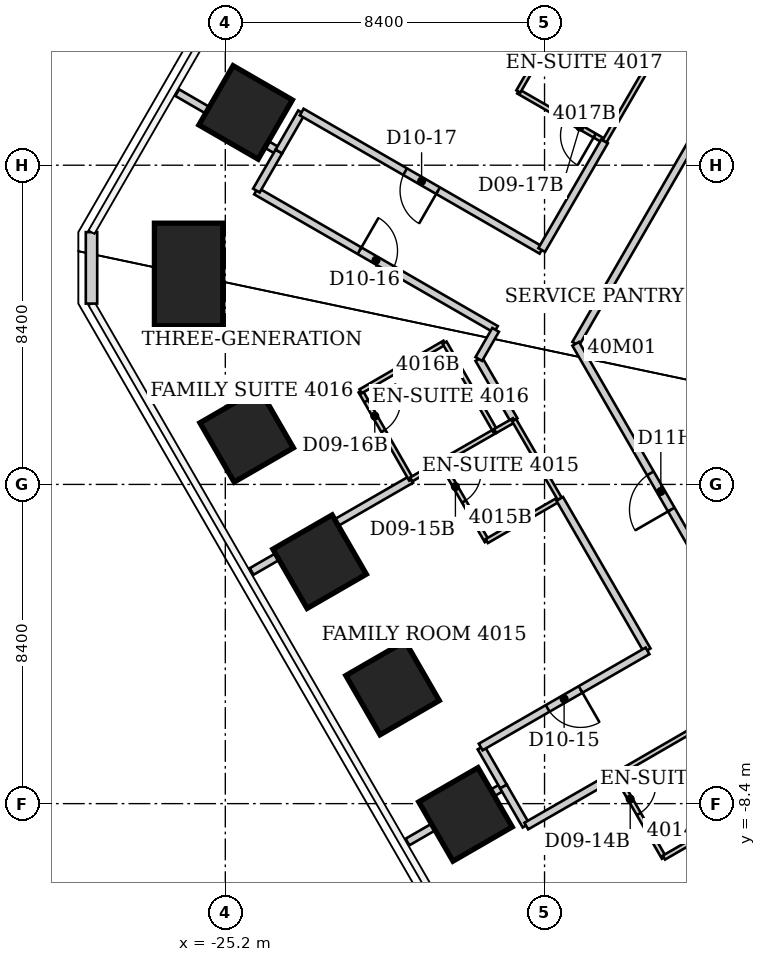
"""IFC4 building model, lengths in metres.
Left out: names, types, materials, properties, quantities, classifications, styles, units other than length and angle.
Written with IfcOpenShell. Run it as: python <this file> out.ifc"""

import sys

from ifc_helpers import new_model, si_unit, direction, frame, frame_2d, origin, origin_2d, place, context, subcontext, project, spatial, rectangle, extrude, element, fill, save


model = new_model("IFC4")
c1 = context("Model", 3, precision=1e-05, world=origin(), true_north=direction((0.0, 1.0)))
c2 = subcontext(c1, "Body", "Model", "MODEL_VIEW")
j1 = project(units=[si_unit("LENGTHUNIT", "METRE"), si_unit("PLANEANGLEUNIT", "RADIAN")], contexts=[c1])
p1 = place(None, origin())
s1 = spatial("IfcSite", under=j1, at=p1, CompositionType="ELEMENT")
p2 = place(p1, origin())
s2 = spatial("IfcBuilding", under=s1, at=p2, CompositionType="ELEMENT")
p3 = place(p2, frame((0.0, 0.0, 161.4)))
s3 = spatial("IfcBuildingStorey", under=s2, at=p3, CompositionType="ELEMENT", Elevation=161.4)
p4 = place(p3, frame((-18.88, -8.684, 0.0), z_axis=(0.043125124656, 0.019829856427, 0.998872864992), x_axis=(-0.865002196318, -0.499537256443, 0.047262350669)))
e1 = element("IfcColumn", 1, at=p4, inside=s3, PredefinedType="COLUMN", context=c2, shape_type="SweptSolid", body=[
    extrude(rectangle(XDim=1.8, YDim=1.8, at=origin_2d()), origin(), (0.0, 0.0, 1.0), 3.804),
])
p5 = place(p3, frame((-20.8, -5.358, 0.0), z_axis=(0.047485394503, 0.012192195886, 0.998797520856), x_axis=(-0.865155048747, -0.499275895122, 0.047226286935)))
e2 = element("IfcColumn", 2, at=p5, inside=s3, PredefinedType="COLUMN", context=c2, shape_type="SweptSolid", body=[
    extrude(rectangle(XDim=1.8, YDim=1.8, at=origin_2d()), origin(), (0.0, 0.0, 1.0), 3.805),
])
p6 = place(p3, frame((-22.719, -2.033, 0.0), z_axis=(0.05184096697, 0.004683651719, 0.998644369909), x_axis=(-0.8641219969, -0.501063474394, 0.047207722912)))
e3 = element("IfcColumn", 3, at=p6, inside=s3, PredefinedType="COLUMN", context=c2, shape_type="SweptSolid", body=[
    extrude(rectangle(XDim=1.8, YDim=1.8, at=origin_2d()), origin(), (0.0, 0.0, 1.0), 3.805),
])
p7 = place(p3, frame((-24.638, 1.292, 0.0), z_axis=(0.056190949949, -0.002950666322, 0.998415680322), x_axis=(-0.864380324341, -0.500621456598, 0.047167913724)))
e4 = element("IfcColumn", 4, at=p7, inside=s3, PredefinedType="COLUMN", context=c2, shape_type="SweptSolid", body=[
    extrude(rectangle(XDim=1.8, YDim=1.8, at=origin_2d()), origin(), (0.0, 0.0, 1.0), 3.806),
])
p8 = place(p3, frame((-26.166, 5.524, 0.0), z_axis=(0.06021332392, -0.012696739229, 0.998104778285), x_axis=(-0.998185498237, -0.001024676941, 0.060205158806)))
e5 = element("IfcColumn", 5, at=p8, inside=s3, PredefinedType="COLUMN", context=c2, shape_type="SweptSolid", body=[
    extrude(rectangle(XDim=1.8, YDim=2.7, at=origin_2d()), origin(), (0.0, 0.0, 1.0), 3.807),
])
p9 = place(p3, frame((-24.665, 9.788, 0.0), z_axis=(0.055410421986, -0.021997424469, 0.99822131737), x_axis=(-0.864198060677, 0.499682708675, 0.058982222519)))
e6 = element("IfcColumn", 6, at=p9, inside=s3, PredefinedType="COLUMN", context=c2, shape_type="SweptSolid", body=[
    extrude(rectangle(XDim=1.8, YDim=1.8, at=origin_2d()), origin(), (0.0, 0.0, 1.0), 3.807),
])
p10 = place(p3, frame((-28.721, 4.759, 0.0), z_axis=(0.0, 0.0, 1.0), x_axis=(0.0, 1.0, 0.0)))
e7 = element("IfcWall", 7, at=p10, inside=s3, PredefinedType="SOLIDWALL", context=c2, shape_type="SweptSolid", body=[
    extrude(rectangle(XDim=1.88, YDim=0.3, at=frame_2d((0.94, 0.0))), origin(), (0.0, 0.0, 1.0), 3.64),
])
p11 = place(p3, frame((-26.466, 10.31, 0.0), z_axis=(0.0, 0.0, 1.0), x_axis=(0.865362911021, -0.501145719556, 0.0)))
e8 = element("IfcWall", 8, at=p11, inside=s3, PredefinedType="PARTITIONING", context=c2, shape_type="SweptSolid", body=[
    extrude(rectangle(XDim=3.077, YDim=0.2, at=frame_2d((1.539, 0.0))), origin(), (0.0, 0.0, 1.0), 3.64),
])
p12 = place(p3, frame((-24.506, -2.29, 0.0), z_axis=(0.0, 0.0, 1.0), x_axis=(0.86626361228, 0.499587183622, 0.0)))
e9 = element("IfcWall", 9, at=p12, inside=s3, PredefinedType="PARTITIONING", context=c2, shape_type="SweptSolid", body=[
    extrude(rectangle(XDim=4.844, YDim=0.2, at=frame_2d((2.422, 0.0))), origin(), (0.0, 0.0, 1.0), 3.64),
])
p13 = place(p3, frame((-24.39, 7.72, 0.0), z_axis=(0.0, 0.0, 1.0), x_axis=(0.86620846199, -0.499682799761, 0.0)))
e10 = element("IfcWall", 10, at=p13, inside=s3, PredefinedType="PARTITIONING", context=c2, shape_type="SweptSolid", body=[
    extrude(rectangle(XDim=7.284, YDim=0.2, at=frame_2d((3.642, 0.0))), origin(), (0.0, 0.0, 1.0), 3.64),
])
p14 = place(p13, frame((3.142, 0.0, 0.0)))
e11 = element("IfcOpeningElement", 11, at=p14, cuts=e10, PredefinedType="OPENING", context=c2, shape_type="SweptSolid", body=[
    extrude(rectangle(XDim=1.0, YDim=2.13, at=frame_2d((0.5, 1.065))), frame((0.0, 0.1, 0.0), z_axis=(0.0, -1.0, 0.0), x_axis=(1.0, 0.0, 0.0)), (0.0, 0.0, 1.0), 0.2),
])
p15 = place(p3, frame((-23.79, 8.76, 0.0), z_axis=(0.0, 0.0, 1.0), x_axis=(-0.499704629046, -0.866195869137, 0.0)))
e12 = element("IfcWall", 12, at=p15, inside=s3, PredefinedType="PARTITIONING", context=c2, shape_type="SweptSolid", body=[
    extrude(rectangle(XDim=1.186, YDim=0.2, at=frame_2d((0.593, 0.0))), origin(), (0.0, 0.0, 1.0), 3.64),
])
p16 = place(p3, frame((-23.195, 9.791, 0.0), z_axis=(0.0, 0.0, 1.0), x_axis=(-0.499734288277, -0.866178758179, 0.0)))
e13 = element("IfcWall", 13, at=p16, inside=s3, PredefinedType="PARTITIONING", context=c2, shape_type="SweptSolid", body=[
    extrude(rectangle(XDim=1.191, YDim=0.2, at=frame_2d((0.595, 0.0))), origin(), (0.0, 0.0, 1.0), 3.64),
])
p17 = place(p3, frame((-21.64, 2.45, 0.0), z_axis=(0.0, 0.0, 1.0), x_axis=(0.497288831399, -0.867585049529, 0.0)))
e14 = element("IfcWall", 14, at=p17, inside=s3, PredefinedType="PARTITIONING", context=c2, shape_type="SweptSolid", body=[
    extrude(rectangle(XDim=2.674, YDim=0.12, at=frame_2d((1.337, 0.0))), origin(), (0.0, 0.0, 1.0), 3.64),
])
p18 = place(p17, frame((0.3, 0.0, 0.0)))
e15 = element("IfcOpeningElement", 15, at=p18, cuts=e14, PredefinedType="OPENING", context=c2, shape_type="SweptSolid", body=[
    extrude(rectangle(XDim=0.9, YDim=2.03, at=frame_2d((0.45, 1.015))), frame((0.0, 0.06, 0.0), z_axis=(0.0, -1.0, 0.0), x_axis=(1.0, 0.0, 0.0)), (0.0, 0.0, 1.0), 0.12),
])
p19 = place(p3, frame((-20.406, -9.41, 0.0), z_axis=(0.0, 0.0, 1.0), x_axis=(0.865794621161, 0.500399514358, 0.0)))
e16 = element("IfcWall", 16, at=p19, inside=s3, PredefinedType="PARTITIONING", context=c2, shape_type="SweptSolid", body=[
    extrude(rectangle(XDim=2.903, YDim=0.2, at=frame_2d((1.451, 0.0))), origin(), (0.0, 0.0, 1.0), 3.64),
])
p20 = place(p3, frame((-20.31, 0.13, 0.0), z_axis=(0.0, 0.0, 1.0), x_axis=(0.864088651014, 0.503339649926, 0.0)))
e17 = element("IfcWall", 17, at=p20, inside=s3, PredefinedType="PARTITIONING", context=c2, shape_type="SweptSolid", body=[
    extrude(rectangle(XDim=0.914, YDim=0.12, at=frame_2d((0.457, 0.0))), origin(), (0.0, 0.0, 1.0), 3.64),
])
p21 = place(p3, frame((-19.52, 0.59, 0.0), z_axis=(0.0, 0.0, 1.0), x_axis=(0.499693115345, -0.866202511239, 0.0)))
e18 = element("IfcWall", 18, at=p21, inside=s3, PredefinedType="PARTITIONING", context=c2, shape_type="SweptSolid", body=[
    extrude(rectangle(XDim=2.401, YDim=0.12, at=frame_2d((1.201, 0.0))), origin(), (0.0, 0.0, 1.0), 3.64),
])
p22 = place(p21, frame((0.3, 0.0, 0.0)))
e19 = element("IfcOpeningElement", 19, at=p22, cuts=e18, PredefinedType="OPENING", context=c2, shape_type="SweptSolid", body=[
    extrude(rectangle(XDim=0.9, YDim=2.03, at=frame_2d((0.45, 1.015))), frame((0.0, 0.06, 0.0), z_axis=(0.0, -1.0, 0.0), x_axis=(1.0, 0.0, 0.0)), (0.0, 0.0, 1.0), 0.12),
])
p23 = place(p3, frame((-19.52, 0.59, 0.0), z_axis=(0.0, 0.0, 1.0), x_axis=(0.86741733639, 0.49758131449, 0.0)))
e20 = element("IfcWall", 20, at=p23, inside=s3, PredefinedType="PARTITIONING", context=c2, shape_type="SweptSolid", body=[
    extrude(rectangle(XDim=1.64, YDim=0.12, at=frame_2d((0.82, 0.0))), origin(), (0.0, 0.0, 1.0), 3.64),
])
p24 = place(p3, frame((-19.43, 3.73, 0.0), z_axis=(0.0, 0.0, 1.0), x_axis=(-0.865328095335, -0.50120583339, 0.0)))
e21 = element("IfcWall", 21, at=p24, inside=s3, PredefinedType="PARTITIONING", context=c2, shape_type="SweptSolid", body=[
    extrude(rectangle(XDim=2.554, YDim=0.12, at=frame_2d((1.277, 0.0))), origin(), (0.0, 0.0, 1.0), 3.64),
])
p25 = place(p3, frame((-18.53, 3.3, 0.0), z_axis=(0.0, 0.0, 1.0), x_axis=(0.50013539823, -0.865947217466, 0.0)))
e22 = element("IfcWall", 22, at=p25, inside=s3, PredefinedType="PARTITIONING", context=c2, shape_type="SweptSolid", body=[
    extrude(rectangle(XDim=1.859, YDim=0.2, at=frame_2d((0.93, 0.0))), origin(), (0.0, 0.0, 1.0), 3.64),
])
p26 = place(p3, frame((-18.472, -6.923, 0.0), z_axis=(0.0, 0.0, 1.0), x_axis=(0.499793761865, -0.866144442689, 0.0)))
e23 = element("IfcWall", 23, at=p26, inside=s3, PredefinedType="PARTITIONING", context=c2, shape_type="SweptSolid", body=[
    extrude(rectangle(XDim=1.186, YDim=0.2, at=frame_2d((0.593, 0.0))), origin(), (0.0, 0.0, 1.0), 3.64),
])
p27 = place(p3, frame((-18.32, -1.49, 0.0), z_axis=(0.0, 0.0, 1.0), x_axis=(0.865732595383, 0.500506816428, 0.0)))
e24 = element("IfcWall", 24, at=p27, inside=s3, PredefinedType="PARTITIONING", context=c2, shape_type="SweptSolid", body=[
    extrude(rectangle(XDim=2.218, YDim=0.12, at=frame_2d((1.109, 0.0))), origin(), (0.0, 0.0, 1.0), 3.64),
])
p28 = place(p3, frame((-18.1, 1.41, 0.0), z_axis=(0.0, 0.0, 1.0), x_axis=(-0.497288831399, 0.867585049529, 0.0)))
e25 = element("IfcWall", 25, at=p28, inside=s3, PredefinedType="PARTITIONING", context=c2, shape_type="SweptSolid", body=[
    extrude(rectangle(XDim=2.674, YDim=0.12, at=frame_2d((1.337, 0.0))), origin(), (0.0, 0.0, 1.0), 3.64),
])
p29 = place(p3, frame((-18.098, 1.406, 0.0), z_axis=(0.0, 0.0, 1.0), x_axis=(0.86863611018, 0.495450611152, 0.0)))
e26 = element("IfcWall", 26, at=p29, inside=s3, PredefinedType="PARTITIONING", context=c2, shape_type="SweptSolid", body=[
    extrude(rectangle(XDim=0.573, YDim=0.12, at=frame_2d((0.287, 0.0))), origin(), (0.0, 0.0, 1.0), 3.64),
])
p30 = place(p3, frame((-18.087, 4.067, 0.0), z_axis=(0.0, 0.0, 1.0), x_axis=(-0.499905448813, -0.866079986056, 0.0)))
e27 = element("IfcWall", 27, at=p30, inside=s3, PredefinedType="PARTITIONING", context=c2, shape_type="SweptSolid", body=[
    extrude(rectangle(XDim=0.885, YDim=0.2, at=frame_2d((0.443, 0.0))), origin(), (0.0, 0.0, 1.0), 3.64),
])
p31 = place(p3, frame((-17.88, -7.95, 0.0), z_axis=(0.0, 0.0, 1.0), x_axis=(0.499550123941, -0.866284984096, 0.0)))
e28 = element("IfcWall", 28, at=p31, inside=s3, PredefinedType="PARTITIONING", context=c2, shape_type="SweptSolid", body=[
    extrude(rectangle(XDim=1.186, YDim=0.2, at=frame_2d((0.593, 0.0))), origin(), (0.0, 0.0, 1.0), 3.64),
])
p32 = place(p3, frame((-17.6, 1.69, 0.0), z_axis=(0.0, 0.0, 1.0), x_axis=(0.501623408317, -0.865086097581, 0.0)))
e29 = element("IfcWall", 29, at=p32, inside=s3, PredefinedType="PARTITIONING", context=c2, shape_type="SweptSolid", body=[
    extrude(rectangle(XDim=2.393, YDim=0.12, at=frame_2d((1.196, 0.0))), origin(), (0.0, 0.0, 1.0), 3.64),
])
p33 = place(p3, frame((-17.49, 10.34, 0.0), z_axis=(0.0, 0.0, 1.0), x_axis=(0.866114241029, -0.499846097802, 0.0)))
e30 = element("IfcWall", 30, at=p33, inside=s3, PredefinedType="PARTITIONING", context=c2, shape_type="SweptSolid", body=[
    extrude(rectangle(XDim=2.621, YDim=0.12, at=frame_2d((1.311, 0.0))), origin(), (0.0, 0.0, 1.0), 3.64),
])
p34 = place(p33, frame((1.421, 0.0, 0.0)))
e31 = element("IfcOpeningElement", 31, at=p34, cuts=e30, PredefinedType="OPENING", context=c2, shape_type="SweptSolid", body=[
    extrude(rectangle(XDim=0.9, YDim=2.03, at=frame_2d((0.45, 1.015))), frame((0.0, 0.06, 0.0), z_axis=(0.0, -1.0, 0.0), x_axis=(1.0, 0.0, 0.0)), (0.0, 0.0, 1.0), 0.12),
])
p35 = place(p3, frame((-17.28, -8.99, 0.0), z_axis=(0.0, 0.0, 1.0), x_axis=(0.867137826992, 0.49806825737, 0.0)))
e32 = element("IfcWall", 32, at=p35, inside=s3, PredefinedType="PARTITIONING", context=c2, shape_type="SweptSolid", body=[
    extrude(rectangle(XDim=2.71, YDim=0.2, at=frame_2d((1.355, 0.0))), origin(), (0.0, 0.0, 1.0), 3.64),
])
p36 = place(p3, frame((-16.88, 6.16, 0.0), z_axis=(0.0, 0.0, 1.0), x_axis=(-0.866202323954, 0.499693439997, 0.0)))
e33 = element("IfcWall", 33, at=p36, inside=s3, PredefinedType="PARTITIONING", context=c2, shape_type="SweptSolid", body=[
    extrude(rectangle(XDim=7.285, YDim=0.2, at=frame_2d((3.642, 0.0))), origin(), (0.0, 0.0, 1.0), 3.64),
])
p37 = place(p36, frame((3.142, 0.0, 0.0)))
e34 = element("IfcOpeningElement", 34, at=p37, cuts=e33, PredefinedType="OPENING", context=c2, shape_type="SweptSolid", body=[
    extrude(rectangle(XDim=1.0, YDim=2.13, at=frame_2d((0.5, 1.065))), frame((0.0, 0.1, 0.0), z_axis=(0.0, -1.0, 0.0), x_axis=(1.0, 0.0, 0.0)), (0.0, 0.0, 1.0), 0.2),
])
p38 = place(p3, frame((-16.875, 6.169, 0.0), z_axis=(0.0, 0.0, 1.0), x_axis=(0.500689767595, 0.865626799854, 0.0)))
e35 = element("IfcWall", 35, at=p38, inside=s3, PredefinedType="PARTITIONING", context=c2, shape_type="SweptSolid", body=[
    extrude(rectangle(XDim=3.305, YDim=0.2, at=frame_2d((1.653, 0.0))), origin(), (0.0, 0.0, 1.0), 3.64),
])
p39 = place(p3, frame((-16.4, -0.38, 0.0), z_axis=(0.0, 0.0, 1.0), x_axis=(0.500091179446, -0.865972754907, 0.0)))
e36 = element("IfcWall", 36, at=p39, inside=s3, PredefinedType="PARTITIONING", context=c2, shape_type="SweptSolid", body=[
    extrude(rectangle(XDim=4.604, YDim=0.2, at=frame_2d((2.302, 0.0))), origin(), (0.0, 0.0, 1.0), 3.64),
])
p40 = place(p3, frame((-16.29, 12.41, 0.0), z_axis=(0.0, 0.0, 1.0), x_axis=(-0.501547039172, -0.865130376012, 0.0)))
e37 = element("IfcWall", 37, at=p40, inside=s3, PredefinedType="PARTITIONING", context=c2, shape_type="SweptSolid", body=[
    extrude(rectangle(XDim=2.393, YDim=0.12, at=frame_2d((1.196, 0.0))), origin(), (0.0, 0.0, 1.0), 3.64),
])
p41 = place(p3, frame((-15.98, 3.7, 0.0), z_axis=(0.0, 0.0, 1.0), x_axis=(0.500093981358, 0.865971136822, 0.0)))
e38 = element("IfcWall", 38, at=p41, inside=s3, PredefinedType="PARTITIONING", context=c2, shape_type="SweptSolid", body=[
    extrude(rectangle(XDim=8.418, YDim=0.2, at=frame_2d((4.209, 0.0))), origin(), (0.0, 0.0, 1.0), 3.64),
])
p42 = place(p3, frame((-15.22, 9.03, 0.0), z_axis=(0.0, 0.0, 1.0), x_axis=(0.501502765098, 0.865156041763, 0.0)))
e39 = element("IfcWall", 39, at=p42, inside=s3, PredefinedType="PARTITIONING", context=c2, shape_type="SweptSolid", body=[
    extrude(rectangle(XDim=2.393, YDim=0.12, at=frame_2d((1.196, 0.0))), origin(), (0.0, 0.0, 1.0), 3.64),
])
p43 = place(p3, frame((-14.92, -7.63, 0.0), z_axis=(0.0, 0.0, 1.0), x_axis=(0.498665353881, -0.866794592068, 0.0)))
e40 = element("IfcWall", 40, at=p43, inside=s3, PredefinedType="PARTITIONING", context=c2, shape_type="SweptSolid", body=[
    extrude(rectangle(XDim=2.527, YDim=0.12, at=frame_2d((1.263, 0.0))), origin(), (0.0, 0.0, 1.0), 3.64),
])
p44 = place(p43, frame((0.3, 0.0, 0.0)))
e41 = element("IfcOpeningElement", 41, at=p44, cuts=e40, PredefinedType="OPENING", context=c2, shape_type="SweptSolid", body=[
    extrude(rectangle(XDim=0.9, YDim=2.03, at=frame_2d((0.45, 1.015))), frame((0.0, 0.06, 0.0), z_axis=(0.0, -1.0, 0.0), x_axis=(1.0, 0.0, 0.0)), (0.0, 0.0, 1.0), 0.12),
])
p45 = place(p3, frame((-14.882, 11.597, 0.0), z_axis=(0.0, 0.0, 1.0), x_axis=(0.866181499781, -0.499729536286, 0.0)))
e42 = element("IfcWall", 42, at=p45, inside=s3, PredefinedType="PARTITIONING", context=c2, shape_type="SweptSolid", body=[
    extrude(rectangle(XDim=0.995, YDim=0.12, at=frame_2d((0.497, 0.0))), origin(), (0.0, 0.0, 1.0), 3.64),
])
p46 = place(p3, frame((-14.09, -4.38, 0.0), z_axis=(0.0, 0.0, 1.0), x_axis=(-0.866407705865, -0.499337247977, 0.0)))
e43 = element("IfcWall", 43, at=p46, inside=s3, PredefinedType="PARTITIONING", context=c2, shape_type="SweptSolid", body=[
    extrude(rectangle(XDim=5.067, YDim=0.2, at=frame_2d((2.533, 0.0))), origin(), (0.0, 0.0, 1.0), 3.64),
])
p47 = place(p46, frame((2.033, 0.0, 0.0)))
e44 = element("IfcOpeningElement", 44, at=p47, cuts=e43, PredefinedType="OPENING", context=c2, shape_type="SweptSolid", body=[
    extrude(rectangle(XDim=1.0, YDim=2.13, at=frame_2d((0.5, 1.065))), frame((0.0, 0.1, 0.0), z_axis=(0.0, -1.0, 0.0), x_axis=(1.0, 0.0, 0.0)), (0.0, 0.0, 1.0), 0.2),
])
p48 = place(p3, frame((-14.02, 11.1, 0.0), z_axis=(0.0, 0.0, 1.0), x_axis=(0.499641723021, 0.866232156305, 0.0)))
e45 = element("IfcWall", 45, at=p48, inside=s3, PredefinedType="PARTITIONING", context=c2, shape_type="SweptSolid", body=[
    extrude(rectangle(XDim=2.182, YDim=0.2, at=frame_2d((1.091, 0.0))), origin(), (0.0, 0.0, 1.0), 3.64),
])
p49 = place(p48, frame((0.591, 0.0, 0.0)))
e46 = element("IfcOpeningElement", 46, at=p49, cuts=e45, PredefinedType="OPENING", context=c2, shape_type="SweptSolid", body=[
    extrude(rectangle(XDim=1.0, YDim=2.13, at=frame_2d((0.5, 1.065))), frame((0.0, 0.1, 0.0), z_axis=(0.0, -1.0, 0.0), x_axis=(1.0, 0.0, 0.0)), (0.0, 0.0, 1.0), 0.2),
])
p50 = place(p3, frame((-13.66, -9.82, 0.0), z_axis=(0.0, 0.0, 1.0), x_axis=(0.866345142729, 0.499445786517, 0.0)))
e47 = element("IfcWall", 47, at=p50, inside=s3, PredefinedType="PARTITIONING", context=c2, shape_type="SweptSolid", body=[
    extrude(rectangle(XDim=2.343, YDim=0.12, at=frame_2d((1.171, 0.0))), origin(), (0.0, 0.0, 1.0), 3.64),
])
p51 = place(p3, frame((-12.89, -6.46, 0.0), z_axis=(0.0, 0.0, 1.0), x_axis=(-0.8656366223, -0.500672785493, 0.0)))
e48 = element("IfcWall", 48, at=p51, inside=s3, PredefinedType="PARTITIONING", context=c2, shape_type="SweptSolid", body=[
    extrude(rectangle(XDim=2.357, YDim=0.12, at=frame_2d((1.178, 0.0))), origin(), (0.0, 0.0, 1.0), 3.64),
])
p52 = place(p3, frame((-11.5, -4.07, 0.0), z_axis=(0.0, 0.0, 1.0), x_axis=(-0.499494642712, 0.86631697542, 0.0)))
e49 = element("IfcWall", 49, at=p52, inside=s3, PredefinedType="PARTITIONING", context=c2, shape_type="SweptSolid", body=[
    extrude(rectangle(XDim=8.969, YDim=0.2, at=frame_2d((4.484, 0.0))), origin(), (0.0, 0.0, 1.0), 3.64),
])
p53 = place(p52, frame((3.935, 0.0, 0.0)))
e50 = element("IfcOpeningElement", 50, at=p53, cuts=e49, PredefinedType="OPENING", context=c2, shape_type="SweptSolid", body=[
    extrude(rectangle(XDim=1.1, YDim=2.2, at=frame_2d((0.55, 1.1))), frame((0.0, 0.1, 0.0), z_axis=(0.0, -1.0, 0.0), x_axis=(1.0, 0.0, 0.0)), (0.0, 0.0, 1.0), 0.2),
])
p54 = place(p44, origin())
e51 = element("IfcDoor", 51, at=p54, inside=s3, OperationType="SINGLE_SWING_LEFT", PredefinedType="DOOR", context=c2, shape_type="SweptSolid", body=[
    extrude(rectangle(XDim=0.9, YDim=2.03, at=frame_2d((0.45, 1.015))), frame((0.0, 0.025, 0.0), z_axis=(0.0, -1.0, 0.0), x_axis=(1.0, 0.0, 0.0)), (0.0, 0.0, 1.0), 0.05),
])
fill(e41, e51)
p55 = place(p47, origin())
e52 = element("IfcDoor", 52, at=p55, inside=s3, OperationType="SINGLE_SWING_LEFT", PredefinedType="DOOR", context=c2, shape_type="SweptSolid", body=[
    extrude(rectangle(XDim=1.0, YDim=2.13, at=frame_2d((0.5, 1.065))), frame((0.0, 0.025, 0.0), z_axis=(0.0, -1.0, 0.0), x_axis=(1.0, 0.0, 0.0)), (0.0, 0.0, 1.0), 0.05),
])
fill(e44, e52)
p56 = place(p22, origin())
e53 = element("IfcDoor", 53, at=p56, inside=s3, OperationType="SINGLE_SWING_LEFT", PredefinedType="DOOR", context=c2, shape_type="SweptSolid", body=[
    extrude(rectangle(XDim=0.9, YDim=2.03, at=frame_2d((0.45, 1.015))), frame((0.0, 0.025, 0.0), z_axis=(0.0, -1.0, 0.0), x_axis=(1.0, 0.0, 0.0)), (0.0, 0.0, 1.0), 0.05),
])
fill(e19, e53)
p57 = place(p14, origin())
e54 = element("IfcDoor", 54, at=p57, inside=s3, OperationType="SINGLE_SWING_LEFT", PredefinedType="DOOR", context=c2, shape_type="SweptSolid", body=[
    extrude(rectangle(XDim=1.0, YDim=2.13, at=frame_2d((0.5, 1.065))), frame((0.0, 0.025, 0.0), z_axis=(0.0, -1.0, 0.0), x_axis=(1.0, 0.0, 0.0)), (0.0, 0.0, 1.0), 0.05),
])
fill(e11, e54)
p58 = place(p18, origin())
e55 = element("IfcDoor", 55, at=p58, inside=s3, OperationType="SINGLE_SWING_LEFT", PredefinedType="DOOR", context=c2, shape_type="SweptSolid", body=[
    extrude(rectangle(XDim=0.9, YDim=2.03, at=frame_2d((0.45, 1.015))), frame((0.0, 0.025, 0.0), z_axis=(0.0, -1.0, 0.0), x_axis=(1.0, 0.0, 0.0)), (0.0, 0.0, 1.0), 0.05),
])
fill(e15, e55)
p59 = place(p37, origin())
e56 = element("IfcDoor", 56, at=p59, inside=s3, OperationType="SINGLE_SWING_LEFT", PredefinedType="DOOR", context=c2, shape_type="SweptSolid", body=[
    extrude(rectangle(XDim=1.0, YDim=2.13, at=frame_2d((0.5, 1.065))), frame((0.0, 0.025, 0.0), z_axis=(0.0, -1.0, 0.0), x_axis=(1.0, 0.0, 0.0)), (0.0, 0.0, 1.0), 0.05),
])
fill(e34, e56)
p60 = place(p34, origin())
e57 = element("IfcDoor", 57, at=p60, inside=s3, OperationType="SINGLE_SWING_RIGHT", PredefinedType="DOOR", context=c2, shape_type="SweptSolid", body=[
    extrude(rectangle(XDim=0.9, YDim=2.03, at=frame_2d((0.45, 1.015))), frame((0.0, 0.025, 0.0), z_axis=(0.0, -1.0, 0.0), x_axis=(1.0, 0.0, 0.0)), (0.0, 0.0, 1.0), 0.05),
])
fill(e31, e57)
p61 = place(p53, origin())
e58 = element("IfcDoor", 58, at=p61, inside=s3, OperationType="SINGLE_SWING_LEFT", PredefinedType="DOOR", context=c2, shape_type="SweptSolid", body=[
    extrude(rectangle(XDim=1.1, YDim=2.2, at=frame_2d((0.55, 1.1))), frame((0.0, 0.025, 0.0), z_axis=(0.0, -1.0, 0.0), x_axis=(1.0, 0.0, 0.0)), (0.0, 0.0, 1.0), 0.05),
])
fill(e50, e58)
save(model, sys.argv[1])
